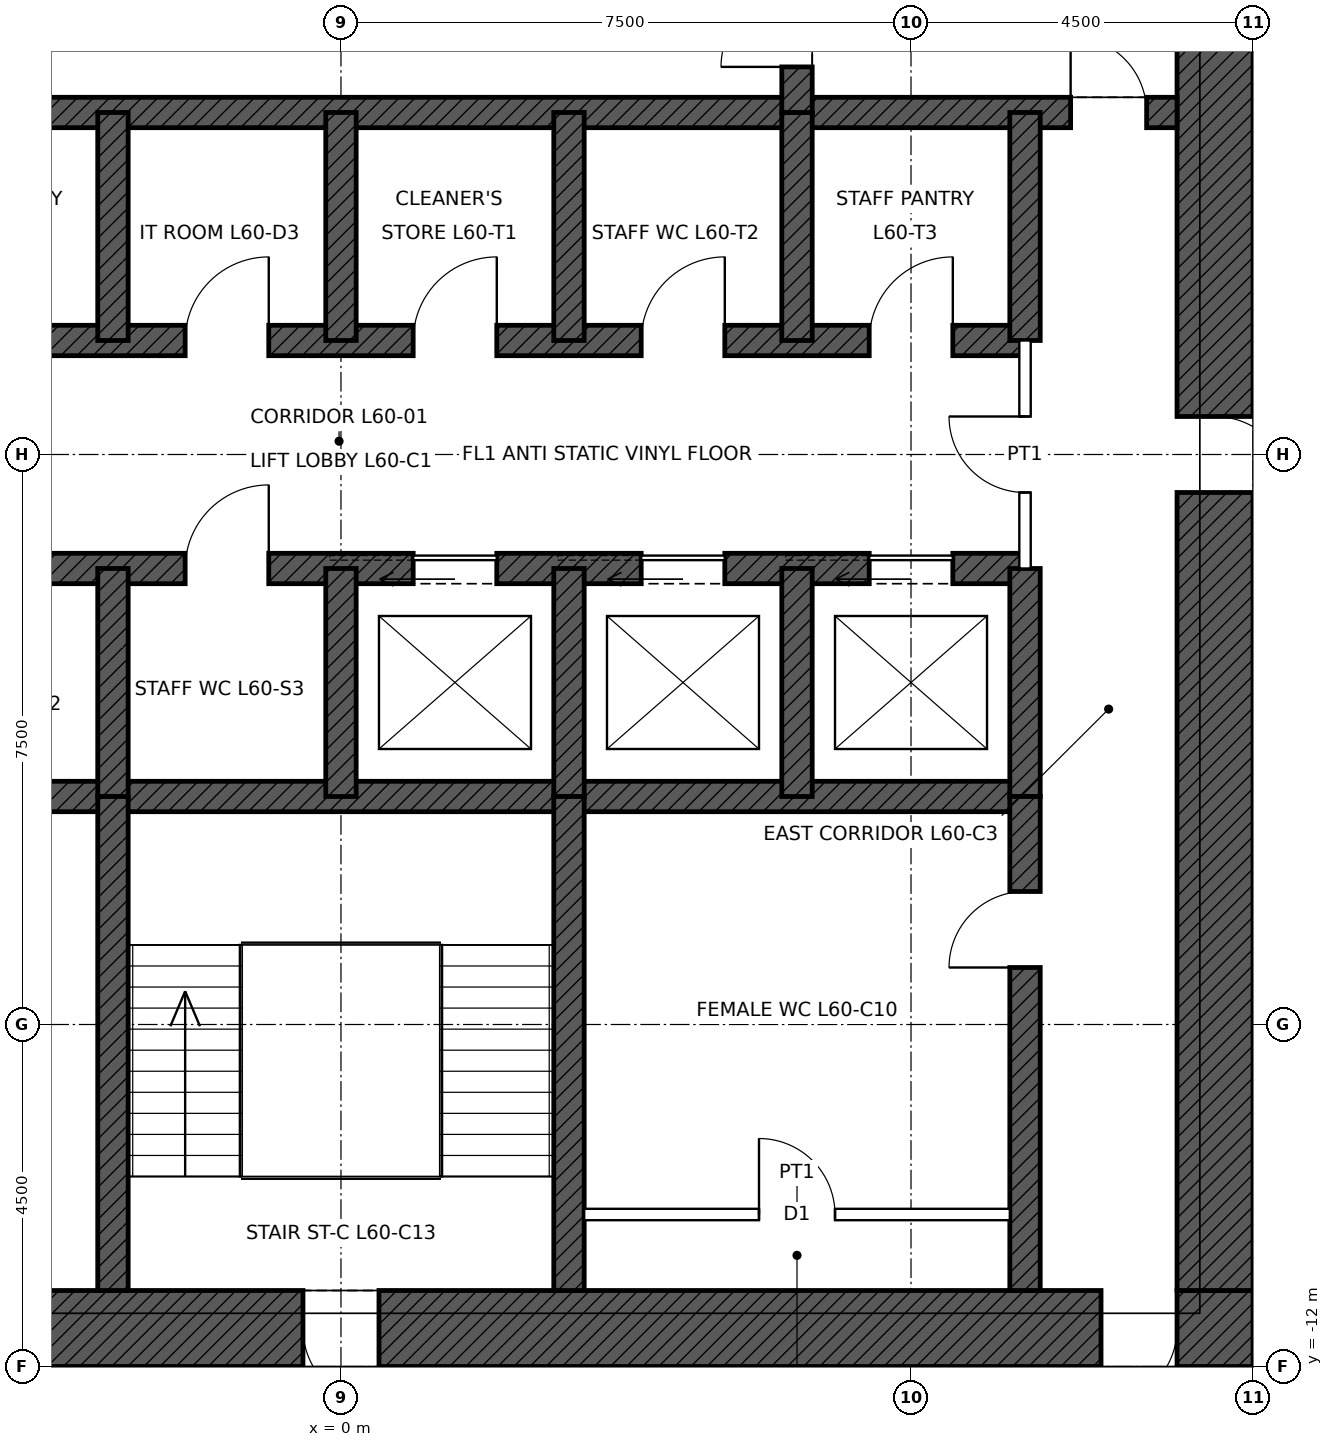
"""IFC4 building model, lengths in metres.
Left out: names, types, materials, properties, quantities, classifications, styles, units other than length and angle.
Written with IfcOpenShell. Run it as: python <this file> out.ifc"""

import sys

from ifc_helpers import new_model, si_unit, direction, frame, frame_2d, origin, place, context, subcontext, project, spatial, rectangle, extrude, element, fill, save


model = new_model("IFC4")
c1 = context("Model", 3, precision=1e-05, world=origin(), true_north=direction((0.0, 1.0)))
c2 = subcontext(c1, "Body", "Model", "MODEL_VIEW")
j1 = project(units=[si_unit("LENGTHUNIT", "METRE"), si_unit("PLANEANGLEUNIT", "RADIAN")], contexts=[c1])
p1 = place(None, origin())
s1 = spatial("IfcSite", under=j1, at=p1, CompositionType="ELEMENT")
p2 = place(p1, origin())
s2 = spatial("IfcBuilding", under=s1, at=p2, CompositionType="ELEMENT")
p3 = place(p2, frame((0.0, 0.0, 275.9)))
s3 = spatial("IfcBuildingStorey", under=s2, at=p3, CompositionType="ELEMENT", Elevation=275.9)
p4 = place(p3, frame((12.0, -11.5, 0.0), z_axis=(0.0, 0.0, 1.0), x_axis=(-1.0, 0.0, 0.0)))
e1 = element("IfcWall", 1, at=p4, inside=s3, PredefinedType="SHEAR", context=c2, shape_type="SweptSolid", body=[
    extrude(rectangle(XDim=24.0, YDim=1.0, at=frame_2d((12.0, 0.0))), origin(), (0.0, 0.0, 1.0), 4.0),
])
p5 = place(p4, frame((11.5, 0.0, 0.0)))
e2 = element("IfcOpeningElement", 2, at=p5, cuts=e1, PredefinedType="OPENING", context=c2, shape_type="SweptSolid", body=[
    extrude(rectangle(XDim=1.0, YDim=2.1, at=frame_2d((0.5, 1.05))), frame((0.0, 0.51, 0.0), z_axis=(0.0, -1.0, 0.0), x_axis=(1.0, 0.0, 0.0)), (0.0, 0.0, 1.0), 1.02),
])
p6 = place(p4, frame((1.0, 0.0, 0.0)))
e3 = element("IfcOpeningElement", 3, at=p6, cuts=e1, PredefinedType="OPENING", context=c2, shape_type="SweptSolid", body=[
    extrude(rectangle(XDim=1.0, YDim=2.4, at=frame_2d((0.5, 1.2))), frame((0.0, 0.51, 0.0), z_axis=(0.0, -1.0, 0.0), x_axis=(1.0, 0.0, 0.0)), (0.0, 0.0, 1.0), 1.02),
])
p7 = place(p3, frame((11.5, 11.0, 0.0), z_axis=(0.0, 0.0, 1.0), x_axis=(0.0, -1.0, 0.0)))
e4 = element("IfcWall", 4, at=p7, inside=s3, PredefinedType="SHEAR", context=c2, shape_type="SweptSolid", body=[
    extrude(rectangle(XDim=22.0, YDim=1.0, at=frame_2d((11.0, 0.0))), origin(), (0.0, 0.0, 1.0), 4.0),
])
p8 = place(p7, frame((10.5, 0.0, 0.0)))
e5 = element("IfcOpeningElement", 5, at=p8, cuts=e4, PredefinedType="OPENING", context=c2, shape_type="SweptSolid", body=[
    extrude(rectangle(XDim=1.0, YDim=2.4, at=frame_2d((0.5, 1.2))), frame((0.0, 0.51, 0.0), z_axis=(0.0, -1.0, 0.0), x_axis=(1.0, 0.0, 0.0)), (0.0, 0.0, 1.0), 1.02),
])
p9 = place(p3, frame((-11.0, 4.5, 0.0), z_axis=(0.0, 0.0, 1.0), x_axis=(1.0, 0.0, 0.0)))
e6 = element("IfcWall", 6, at=p9, inside=s3, PredefinedType="SHEAR", context=c2, shape_type="SweptSolid", body=[
    extrude(rectangle(XDim=22.0, YDim=0.4, at=frame_2d((11.0, 0.0))), origin(), (0.0, 0.0, 1.0), 4.0),
])
p10 = place(p9, frame((0.4, 0.0, 0.0)))
e7 = element("IfcOpeningElement", 7, at=p10, cuts=e6, PredefinedType="OPENING", context=c2, shape_type="SweptSolid", body=[
    extrude(rectangle(XDim=1.0, YDim=2.1, at=frame_2d((0.5, 1.05))), frame((0.0, 0.21, 0.0), z_axis=(0.0, -1.0, 0.0), x_axis=(1.0, 0.0, 0.0)), (0.0, 0.0, 1.0), 0.42),
])
p11 = place(p9, frame((20.6, 0.0, 0.0)))
e8 = element("IfcOpeningElement", 8, at=p11, cuts=e6, PredefinedType="OPENING", context=c2, shape_type="SweptSolid", body=[
    extrude(rectangle(XDim=1.0, YDim=2.1, at=frame_2d((0.5, 1.05))), frame((0.0, 0.21, 0.0), z_axis=(0.0, -1.0, 0.0), x_axis=(1.0, 0.0, 0.0)), (0.0, 0.0, 1.0), 0.42),
])
p12 = place(p3, frame((-9.0, 1.5, 0.0), z_axis=(0.0, 0.0, 1.0), x_axis=(1.0, 0.0, 0.0)))
e9 = element("IfcWall", 9, at=p12, inside=s3, PredefinedType="SHEAR", context=c2, shape_type="SweptSolid", body=[
    extrude(rectangle(XDim=18.0, YDim=0.4, at=frame_2d((9.0, 0.0))), origin(), (0.0, 0.0, 1.0), 4.0),
])
p13 = place(p12, frame((0.95, 0.0, 0.0)))
e10 = element("IfcOpeningElement", 10, at=p13, cuts=e9, PredefinedType="OPENING", context=c2, shape_type="SweptSolid", body=[
    extrude(rectangle(XDim=1.1, YDim=2.1, at=frame_2d((0.55, 1.05))), frame((0.0, 0.21, 0.0), z_axis=(0.0, -1.0, 0.0), x_axis=(1.0, 0.0, 0.0)), (0.0, 0.0, 1.0), 0.42),
])
p14 = place(p12, frame((3.95, 0.0, 0.0)))
e11 = element("IfcOpeningElement", 11, at=p14, cuts=e9, PredefinedType="OPENING", context=c2, shape_type="SweptSolid", body=[
    extrude(rectangle(XDim=1.1, YDim=2.1, at=frame_2d((0.55, 1.05))), frame((0.0, 0.21, 0.0), z_axis=(0.0, -1.0, 0.0), x_axis=(1.0, 0.0, 0.0)), (0.0, 0.0, 1.0), 0.42),
])
p15 = place(p12, frame((6.95, 0.0, 0.0)))
e12 = element("IfcOpeningElement", 12, at=p15, cuts=e9, PredefinedType="OPENING", context=c2, shape_type="SweptSolid", body=[
    extrude(rectangle(XDim=1.1, YDim=2.1, at=frame_2d((0.55, 1.05))), frame((0.0, 0.21, 0.0), z_axis=(0.0, -1.0, 0.0), x_axis=(1.0, 0.0, 0.0)), (0.0, 0.0, 1.0), 0.42),
])
p16 = place(p12, frame((9.95, 0.0, 0.0)))
e13 = element("IfcOpeningElement", 13, at=p16, cuts=e9, PredefinedType="OPENING", context=c2, shape_type="SweptSolid", body=[
    extrude(rectangle(XDim=1.1, YDim=2.1, at=frame_2d((0.55, 1.05))), frame((0.0, 0.21, 0.0), z_axis=(0.0, -1.0, 0.0), x_axis=(1.0, 0.0, 0.0)), (0.0, 0.0, 1.0), 0.42),
])
p17 = place(p12, frame((12.95, 0.0, 0.0)))
e14 = element("IfcOpeningElement", 14, at=p17, cuts=e9, PredefinedType="OPENING", context=c2, shape_type="SweptSolid", body=[
    extrude(rectangle(XDim=1.1, YDim=2.1, at=frame_2d((0.55, 1.05))), frame((0.0, 0.21, 0.0), z_axis=(0.0, -1.0, 0.0), x_axis=(1.0, 0.0, 0.0)), (0.0, 0.0, 1.0), 0.42),
])
p18 = place(p12, frame((15.95, 0.0, 0.0)))
e15 = element("IfcOpeningElement", 15, at=p18, cuts=e9, PredefinedType="OPENING", context=c2, shape_type="SweptSolid", body=[
    extrude(rectangle(XDim=1.1, YDim=2.1, at=frame_2d((0.55, 1.05))), frame((0.0, 0.21, 0.0), z_axis=(0.0, -1.0, 0.0), x_axis=(1.0, 0.0, 0.0)), (0.0, 0.0, 1.0), 0.42),
])
p19 = place(p3, frame((-9.0, -1.5, 0.0), z_axis=(0.0, 0.0, 1.0), x_axis=(1.0, 0.0, 0.0)))
e16 = element("IfcWall", 16, at=p19, inside=s3, PredefinedType="SHEAR", context=c2, shape_type="SweptSolid", body=[
    extrude(rectangle(XDim=18.0, YDim=0.4, at=frame_2d((9.0, 0.0))), origin(), (0.0, 0.0, 1.0), 4.0),
])
p20 = place(p19, frame((9.95, 0.0, 0.0)))
e17 = element("IfcOpeningElement", 17, at=p20, cuts=e16, PredefinedType="OPENING", context=c2, shape_type="SweptSolid", body=[
    extrude(rectangle(XDim=1.1, YDim=2.1, at=frame_2d((0.55, 1.05))), frame((0.0, 0.21, 0.0), z_axis=(0.0, -1.0, 0.0), x_axis=(1.0, 0.0, 0.0)), (0.0, 0.0, 1.0), 0.42),
])
p21 = place(p19, frame((12.95, 0.0, 0.0)))
e18 = element("IfcOpeningElement", 18, at=p21, cuts=e16, PredefinedType="OPENING", context=c2, shape_type="SweptSolid", body=[
    extrude(rectangle(XDim=1.1, YDim=2.1, at=frame_2d((0.55, 1.05))), frame((0.0, 0.21, 0.0), z_axis=(0.0, -1.0, 0.0), x_axis=(1.0, 0.0, 0.0)), (0.0, 0.0, 1.0), 0.42),
])
p22 = place(p19, frame((15.95, 0.0, 0.0)))
e19 = element("IfcOpeningElement", 19, at=p22, cuts=e16, PredefinedType="OPENING", context=c2, shape_type="SweptSolid", body=[
    extrude(rectangle(XDim=1.1, YDim=2.1, at=frame_2d((0.55, 1.05))), frame((0.0, 0.21, 0.0), z_axis=(0.0, -1.0, 0.0), x_axis=(1.0, 0.0, 0.0)), (0.0, 0.0, 1.0), 0.42),
])
p23 = place(p19, frame((0.95, 0.0, 0.0)))
e20 = element("IfcOpeningElement", 20, at=p23, cuts=e16, PredefinedType="OPENING", context=c2, shape_type="SweptSolid", body=[
    extrude(rectangle(XDim=1.1, YDim=2.1, at=frame_2d((0.55, 1.05))), frame((0.0, 0.21, 0.0), z_axis=(0.0, -1.0, 0.0), x_axis=(1.0, 0.0, 0.0)), (0.0, 0.0, 1.0), 0.42),
])
p24 = place(p19, frame((3.95, 0.0, 0.0)))
e21 = element("IfcOpeningElement", 21, at=p24, cuts=e16, PredefinedType="OPENING", context=c2, shape_type="SweptSolid", body=[
    extrude(rectangle(XDim=1.1, YDim=2.1, at=frame_2d((0.55, 1.05))), frame((0.0, 0.21, 0.0), z_axis=(0.0, -1.0, 0.0), x_axis=(1.0, 0.0, 0.0)), (0.0, 0.0, 1.0), 0.42),
])
p25 = place(p19, frame((6.95, 0.0, 0.0)))
e22 = element("IfcOpeningElement", 22, at=p25, cuts=e16, PredefinedType="OPENING", context=c2, shape_type="SweptSolid", body=[
    extrude(rectangle(XDim=1.1, YDim=2.1, at=frame_2d((0.55, 1.05))), frame((0.0, 0.21, 0.0), z_axis=(0.0, -1.0, 0.0), x_axis=(1.0, 0.0, 0.0)), (0.0, 0.0, 1.0), 0.42),
])
p26 = place(p3, frame((-9.0, -4.5, 0.0), z_axis=(0.0, 0.0, 1.0), x_axis=(1.0, 0.0, 0.0)))
e23 = element("IfcWall", 23, at=p26, inside=s3, PredefinedType="SHEAR", context=c2, shape_type="SweptSolid", body=[
    extrude(rectangle(XDim=18.0, YDim=0.4, at=frame_2d((9.0, 0.0))), origin(), (0.0, 0.0, 1.0), 4.0),
])
for number, where, z_axis, x_axis in (
    (24, (9.0, 1.5, 0.0), (0.0, 0.0, 1.0), (0.0, 1.0, 0.0)),
    (25, (9.0, -4.5, 0.0), (0.0, 0.0, 1.0), (0.0, 1.0, 0.0)),
    (26, (-3.0, 1.5, 0.0), (0.0, 0.0, 1.0), (0.0, 1.0, 0.0)),
    (27, (0.0, 1.5, 0.0), (0.0, 0.0, 1.0), (0.0, 1.0, 0.0)),
    (28, (3.0, 1.5, 0.0), (0.0, 0.0, 1.0), (0.0, 1.0, 0.0)),
    (29, (6.0, 1.5, 0.0), (0.0, 0.0, 1.0), (0.0, 1.0, 0.0)),
    (30, (-3.0, -4.5, 0.0), (0.0, 0.0, 1.0), (0.0, 1.0, 0.0)),
    (31, (0.0, -4.5, 0.0), (0.0, 0.0, 1.0), (0.0, 1.0, 0.0)),
    (32, (3.0, -4.5, 0.0), (0.0, 0.0, 1.0), (0.0, 1.0, 0.0)),
    (33, (6.0, -4.5, 0.0), (0.0, 0.0, 1.0), (0.0, 1.0, 0.0)),
):
    element("IfcWall", number, at=place(p3, frame(where, z_axis=z_axis, x_axis=x_axis)), inside=s3, PredefinedType="SHEAR", context=c2, shape_type="SweptSolid", body=[
        extrude(rectangle(XDim=3.0, YDim=0.4, at=frame_2d((1.5, 0.0))), origin(), (0.0, 0.0, 1.0), 4.0),
    ])
p27 = place(p3, frame((6.0, 4.5, 0.0), z_axis=(0.0, 0.0, 1.0), x_axis=(0.0, 1.0, 0.0)))
e34 = element("IfcWall", 34, at=p27, inside=s3, PredefinedType="SHEAR", context=c2, shape_type="SweptSolid", body=[
    extrude(rectangle(XDim=6.5, YDim=0.4, at=frame_2d((3.25, 0.0))), origin(), (0.0, 0.0, 1.0), 4.0),
])
p28 = place(p27, frame((0.6, 0.0, 0.0)))
e35 = element("IfcOpeningElement", 35, at=p28, cuts=e34, PredefinedType="OPENING", context=c2, shape_type="SweptSolid", body=[
    extrude(rectangle(XDim=1.0, YDim=2.1, at=frame_2d((0.5, 1.05))), frame((0.0, 0.21, 0.0), z_axis=(0.0, -1.0, 0.0), x_axis=(1.0, 0.0, 0.0)), (0.0, 0.0, 1.0), 0.42),
])
p29 = place(p3, frame((9.0, -11.0, 0.0), z_axis=(0.0, 0.0, 1.0), x_axis=(0.0, 1.0, 0.0)))
e36 = element("IfcWall", 36, at=p29, inside=s3, PredefinedType="SHEAR", context=c2, shape_type="SweptSolid", body=[
    extrude(rectangle(XDim=6.5, YDim=0.4, at=frame_2d((3.25, 0.0))), origin(), (0.0, 0.0, 1.0), 4.0),
])
p30 = place(p29, frame((4.25, 0.0, 0.0)))
e37 = element("IfcOpeningElement", 37, at=p30, cuts=e36, PredefinedType="OPENING", context=c2, shape_type="SweptSolid", body=[
    extrude(rectangle(XDim=1.0, YDim=2.1, at=frame_2d((0.5, 1.05))), frame((0.0, 0.21, 0.0), z_axis=(0.0, -1.0, 0.0), x_axis=(1.0, 0.0, 0.0)), (0.0, 0.0, 1.0), 0.42),
])
for number, where, z_axis, x_axis in (
    (38, (-3.0, -11.0, 0.0), (0.0, 0.0, 1.0), (0.0, 1.0, 0.0)),
    (39, (3.0, -11.0, 0.0), (0.0, 0.0, 1.0), (0.0, 1.0, 0.0)),
):
    element("IfcWall", number, at=place(p3, frame(where, z_axis=z_axis, x_axis=x_axis)), inside=s3, PredefinedType="SHEAR", context=c2, shape_type="SweptSolid", body=[
        extrude(rectangle(XDim=6.5, YDim=0.4, at=frame_2d((3.25, 0.0))), origin(), (0.0, 0.0, 1.0), 4.0),
    ])
p31 = place(p3, frame((3.2, -10.0, 0.0), z_axis=(0.0, 0.0, 1.0), x_axis=(1.0, 0.0, 0.0)))
e40 = element("IfcWall", 40, at=p31, inside=s3, PredefinedType="PARTITIONING", context=c2, shape_type="SweptSolid", body=[
    extrude(rectangle(XDim=5.6, YDim=0.15, at=frame_2d((2.8, 0.0))), origin(), (0.0, 0.0, 1.0), 3.75),
])
p32 = place(p31, frame((2.3, 0.0, 0.0)))
e41 = element("IfcOpeningElement", 41, at=p32, cuts=e40, PredefinedType="OPENING", context=c2, shape_type="SweptSolid", body=[
    extrude(rectangle(XDim=1.0, YDim=2.1, at=frame_2d((0.5, 1.05))), frame((0.0, 0.085, 0.0), z_axis=(0.0, -1.0, 0.0), x_axis=(1.0, 0.0, 0.0)), (0.0, 0.0, 1.0), 0.17),
])
p33 = place(p3, frame((9.0, -1.5, 0.0), z_axis=(0.0, 0.0, 1.0), x_axis=(0.0, 1.0, 0.0)))
e42 = element("IfcWall", 42, at=p33, inside=s3, PredefinedType="PARTITIONING", context=c2, shape_type="SweptSolid", body=[
    extrude(rectangle(XDim=3.0, YDim=0.15, at=frame_2d((1.5, 0.0))), origin(), (0.0, 0.0, 1.0), 3.75),
])
p34 = place(p33, frame((1.0, 0.0, 0.0)))
e43 = element("IfcOpeningElement", 43, at=p34, cuts=e42, PredefinedType="OPENING", context=c2, shape_type="SweptSolid", body=[
    extrude(rectangle(XDim=1.0, YDim=2.4, at=frame_2d((0.5, 1.2))), frame((0.0, 0.085, 0.0), z_axis=(0.0, -1.0, 0.0), x_axis=(1.0, 0.0, 0.0)), (0.0, 0.0, 1.0), 0.17),
])
p35 = place(p11, origin())
e44 = element("IfcDoor", 44, at=p35, inside=s3, OperationType="SINGLE_SWING_LEFT", PredefinedType="DOOR", context=c2, shape_type="SweptSolid", body=[
    extrude(rectangle(XDim=1.0, YDim=2.1, at=frame_2d((0.5, 1.05))), frame((0.0, 0.025, 0.0), z_axis=(0.0, -1.0, 0.0), x_axis=(1.0, 0.0, 0.0)), (0.0, 0.0, 1.0), 0.05),
])
fill(e8, e44)
p36 = place(p28, origin())
e45 = element("IfcDoor", 45, at=p36, inside=s3, OperationType="SINGLE_SWING_LEFT", PredefinedType="DOOR", context=c2, shape_type="SweptSolid", body=[
    extrude(rectangle(XDim=1.0, YDim=2.1, at=frame_2d((0.5, 1.05))), frame((0.0, 0.025, 0.0), z_axis=(0.0, -1.0, 0.0), x_axis=(1.0, 0.0, 0.0)), (0.0, 0.0, 1.0), 0.05),
])
fill(e35, e45)
p37 = place(p5, origin())
e46 = element("IfcDoor", 46, at=p37, inside=s3, OperationType="SINGLE_SWING_LEFT", PredefinedType="DOOR", context=c2, shape_type="SweptSolid", body=[
    extrude(rectangle(XDim=1.0, YDim=2.1, at=frame_2d((0.5, 1.05))), frame((0.0, 0.485, 0.0), z_axis=(0.0, -1.0, 0.0), x_axis=(1.0, 0.0, 0.0)), (0.0, 0.0, 1.0), 0.05),
])
fill(e2, e46)
p38 = place(p8, origin())
e47 = element("IfcDoor", 47, at=p38, inside=s3, OperationType="SINGLE_SWING_RIGHT", PredefinedType="DOOR", context=c2, shape_type="SweptSolid", body=[
    extrude(rectangle(XDim=1.0, YDim=2.4, at=frame_2d((0.5, 1.2))), frame((0.0, 0.485, 0.0), z_axis=(0.0, -1.0, 0.0), x_axis=(1.0, 0.0, 0.0)), (0.0, 0.0, 1.0), 0.05),
])
fill(e5, e47)
p39 = place(p6, origin())
e48 = element("IfcDoor", 48, at=p39, inside=s3, OperationType="SINGLE_SWING_RIGHT", PredefinedType="DOOR", context=c2, shape_type="SweptSolid", body=[
    extrude(rectangle(XDim=1.0, YDim=2.4, at=frame_2d((0.5, 1.2))), frame((0.0, 0.485, 0.0), z_axis=(0.0, -1.0, 0.0), x_axis=(1.0, 0.0, 0.0)), (0.0, 0.0, 1.0), 0.05),
])
fill(e3, e48)
p40 = place(p30, origin())
e49 = element("IfcDoor", 49, at=p40, inside=s3, OperationType="SINGLE_SWING_LEFT", PredefinedType="DOOR", context=c2, shape_type="SweptSolid", body=[
    extrude(rectangle(XDim=1.0, YDim=2.1, at=frame_2d((0.5, 1.05))), frame((0.0, 0.025, 0.0), z_axis=(0.0, -1.0, 0.0), x_axis=(1.0, 0.0, 0.0)), (0.0, 0.0, 1.0), 0.05),
])
fill(e37, e49)
p41 = place(p20, origin())
e50 = element("IfcDoor", 50, at=p41, inside=s3, OperationType="SLIDING_TO_LEFT", PredefinedType="DOOR", context=c2, shape_type="SweptSolid", body=[
    extrude(rectangle(XDim=1.1, YDim=2.1, at=frame_2d((0.55, 1.05))), frame((0.0, 0.025, 0.0), z_axis=(0.0, -1.0, 0.0), x_axis=(1.0, 0.0, 0.0)), (0.0, 0.0, 1.0), 0.05),
])
fill(e17, e50)
p42 = place(p21, origin())
e51 = element("IfcDoor", 51, at=p42, inside=s3, OperationType="SLIDING_TO_LEFT", PredefinedType="DOOR", context=c2, shape_type="SweptSolid", body=[
    extrude(rectangle(XDim=1.1, YDim=2.1, at=frame_2d((0.55, 1.05))), frame((0.0, 0.025, 0.0), z_axis=(0.0, -1.0, 0.0), x_axis=(1.0, 0.0, 0.0)), (0.0, 0.0, 1.0), 0.05),
])
fill(e18, e51)
p43 = place(p22, origin())
e52 = element("IfcDoor", 52, at=p43, inside=s3, OperationType="SLIDING_TO_LEFT", PredefinedType="DOOR", context=c2, shape_type="SweptSolid", body=[
    extrude(rectangle(XDim=1.1, YDim=2.1, at=frame_2d((0.55, 1.05))), frame((0.0, 0.025, 0.0), z_axis=(0.0, -1.0, 0.0), x_axis=(1.0, 0.0, 0.0)), (0.0, 0.0, 1.0), 0.05),
])
fill(e19, e52)
p44 = place(p32, origin())
e53 = element("IfcDoor", 53, at=p44, inside=s3, OperationType="SINGLE_SWING_LEFT", PredefinedType="DOOR", context=c2, shape_type="SweptSolid", body=[
    extrude(rectangle(XDim=1.0, YDim=2.1, at=frame_2d((0.5, 1.05))), frame((0.0, 0.025, 0.0), z_axis=(0.0, -1.0, 0.0), x_axis=(1.0, 0.0, 0.0)), (0.0, 0.0, 1.0), 0.05),
])
fill(e41, e53)
p45 = place(p34, origin())
e54 = element("IfcDoor", 54, at=p45, inside=s3, OperationType="SINGLE_SWING_RIGHT", PredefinedType="DOOR", context=c2, shape_type="SweptSolid", body=[
    extrude(rectangle(XDim=1.0, YDim=2.4, at=frame_2d((0.5, 1.2))), frame((0.0, 0.025, 0.0), z_axis=(0.0, -1.0, 0.0), x_axis=(1.0, 0.0, 0.0)), (0.0, 0.0, 1.0), 0.05),
])
fill(e43, e54)
p46 = place(p15, origin())
e55 = element("IfcDoor", 55, at=p46, inside=s3, OperationType="SINGLE_SWING_RIGHT", PredefinedType="DOOR", context=c2, shape_type="SweptSolid", body=[
    extrude(rectangle(XDim=1.1, YDim=2.1, at=frame_2d((0.55, 1.05))), frame((0.0, 0.025, 0.0), z_axis=(0.0, -1.0, 0.0), x_axis=(1.0, 0.0, 0.0)), (0.0, 0.0, 1.0), 0.05),
])
fill(e12, e55)
p47 = place(p16, origin())
e56 = element("IfcDoor", 56, at=p47, inside=s3, OperationType="SINGLE_SWING_RIGHT", PredefinedType="DOOR", context=c2, shape_type="SweptSolid", body=[
    extrude(rectangle(XDim=1.1, YDim=2.1, at=frame_2d((0.55, 1.05))), frame((0.0, 0.025, 0.0), z_axis=(0.0, -1.0, 0.0), x_axis=(1.0, 0.0, 0.0)), (0.0, 0.0, 1.0), 0.05),
])
fill(e13, e56)
p48 = place(p17, origin())
e57 = element("IfcDoor", 57, at=p48, inside=s3, OperationType="SINGLE_SWING_RIGHT", PredefinedType="DOOR", context=c2, shape_type="SweptSolid", body=[
    extrude(rectangle(XDim=1.1, YDim=2.1, at=frame_2d((0.55, 1.05))), frame((0.0, 0.025, 0.0), z_axis=(0.0, -1.0, 0.0), x_axis=(1.0, 0.0, 0.0)), (0.0, 0.0, 1.0), 0.05),
])
fill(e14, e57)
p49 = place(p18, origin())
e58 = element("IfcDoor", 58, at=p49, inside=s3, OperationType="SINGLE_SWING_RIGHT", PredefinedType="DOOR", context=c2, shape_type="SweptSolid", body=[
    extrude(rectangle(XDim=1.1, YDim=2.1, at=frame_2d((0.55, 1.05))), frame((0.0, 0.025, 0.0), z_axis=(0.0, -1.0, 0.0), x_axis=(1.0, 0.0, 0.0)), (0.0, 0.0, 1.0), 0.05),
])
fill(e15, e58)
p50 = place(p25, origin())
e59 = element("IfcDoor", 59, at=p50, inside=s3, OperationType="SINGLE_SWING_RIGHT", PredefinedType="DOOR", context=c2, shape_type="SweptSolid", body=[
    extrude(rectangle(XDim=1.1, YDim=2.1, at=frame_2d((0.55, 1.05))), frame((0.0, 0.025, 0.0), z_axis=(0.0, -1.0, 0.0), x_axis=(1.0, 0.0, 0.0)), (0.0, 0.0, 1.0), 0.05),
])
fill(e22, e59)
save(model, sys.argv[1])
